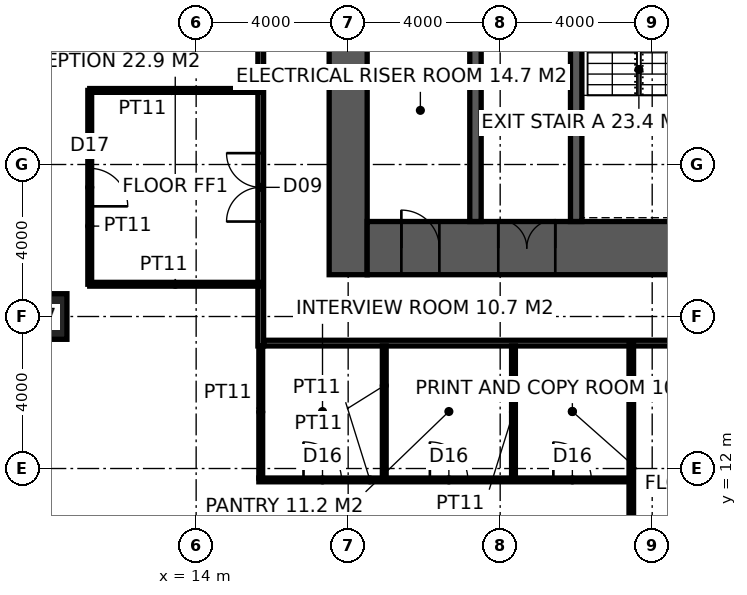
"""IFC4 building model, lengths in metres.
Left out: names, types, materials, properties, quantities, classifications, styles, units other than length and angle.
Written with IfcOpenShell. Run it as: python <this file> out.ifc"""

import sys

from ifc_helpers import new_model, si_unit, direction, frame, frame_2d, origin, origin_2d, place, context, subcontext, project, spatial, rectangle, hollow_rectangle, extrude, element, fill, save


model = new_model("IFC4")
c1 = context("Model", 3, precision=1e-05, world=origin(), true_north=direction((0.0, 1.0)))
c2 = subcontext(c1, "Body", "Model", "MODEL_VIEW")
j1 = project(units=[si_unit("LENGTHUNIT", "METRE"), si_unit("PLANEANGLEUNIT", "RADIAN")], contexts=[c1])
p1 = place(None, origin())
s1 = spatial("IfcSite", under=j1, at=p1, CompositionType="ELEMENT")
p2 = place(p1, origin())
s2 = spatial("IfcBuilding", under=s1, at=p2, CompositionType="ELEMENT")
p3 = place(p2, frame((0.0, 0.0, 43.0)))
s3 = spatial("IfcBuildingStorey", under=s2, at=p3, CompositionType="ELEMENT", Elevation=43.0)
p4 = place(p3, frame((10.0, 16.0, 0.0), z_axis=(0.0, 0.0, 1.0), x_axis=(1.0, 0.0, 0.0)))
e1 = element("IfcColumn", 1, at=p4, inside=s3, PredefinedType="COLUMN", context=c2, shape_type="SweptSolid", body=[
    extrude(hollow_rectangle(XDim=1.2, YDim=1.2, WallThickness=0.1, at=origin_2d()), origin(), (0.0, 0.0, 1.0), 4.0),
])
p5 = place(p3, frame((18.0, 17.1, -0.15), z_axis=(0.0, 0.0, 1.0), x_axis=(0.0, 1.0, 0.0)))
e2 = element("IfcWall", 2, at=p5, inside=s3, PredefinedType="SHEAR", context=c2, shape_type="SweptSolid", body=[
    extrude(rectangle(XDim=19.8, YDim=1.0, at=frame_2d((9.9, 0.0))), origin(), (0.0, 0.0, 1.0), 4.0),
])
p6 = place(p3, frame((18.5, 17.8, -0.15), z_axis=(0.0, 0.0, 1.0), x_axis=(1.0, 0.0, 0.0)))
e3 = element("IfcWall", 3, at=p6, inside=s3, PredefinedType="SHEAR", context=c2, shape_type="SweptSolid", body=[
    extrude(rectangle(XDim=23.4, YDim=1.4, at=frame_2d((11.7, 0.0))), origin(), (0.0, 0.0, 1.0), 4.0),
])
p7 = place(p6, frame((3.45, 0.0, 0.15)))
e4 = element("IfcOpeningElement", 4, at=p7, cuts=e3, PredefinedType="OPENING", context=c2, shape_type="SweptSolid", body=[
    extrude(rectangle(XDim=1.5, YDim=2.4, at=frame_2d((0.75, 1.2))), frame((0.0, 0.71, 0.0), z_axis=(0.0, -1.0, 0.0), x_axis=(1.0, 0.0, 0.0)), (0.0, 0.0, 1.0), 1.42),
])
p8 = place(p6, frame((17.9, 0.0, 0.15)))
e5 = element("IfcOpeningElement", 5, at=p8, cuts=e3, PredefinedType="OPENING", context=c2, shape_type="SweptSolid", body=[
    extrude(rectangle(XDim=1.5, YDim=2.4, at=frame_2d((0.75, 1.2))), frame((0.0, 0.71, 0.0), z_axis=(0.0, -1.0, 0.0), x_axis=(1.0, 0.0, 0.0)), (0.0, 0.0, 1.0), 1.42),
])
p9 = place(p6, frame((0.9, 0.0, 0.15)))
e6 = element("IfcOpeningElement", 6, at=p9, cuts=e3, PredefinedType="OPENING", context=c2, shape_type="SweptSolid", body=[
    extrude(rectangle(XDim=1.0, YDim=2.2, at=frame_2d((0.5, 1.1))), frame((0.0, 0.71, 0.0), z_axis=(0.0, -1.0, 0.0), x_axis=(1.0, 0.0, 0.0)), (0.0, 0.0, 1.0), 1.42),
])
p10 = place(p3, frame((24.0, 18.5, -0.15), z_axis=(0.0, 0.0, 1.0), x_axis=(0.0, 1.0, 0.0)))
e7 = element("IfcWall", 7, at=p10, inside=s3, PredefinedType="SHEAR", context=c2, shape_type="SweptSolid", body=[
    extrude(rectangle(XDim=17.0, YDim=0.3, at=frame_2d((8.5, 0.0))), origin(), (0.0, 0.0, 1.0), 4.0),
])
p11 = place(p10, frame((9.6, 0.0, 0.15)))
e8 = element("IfcOpeningElement", 8, at=p11, cuts=e7, PredefinedType="OPENING", context=c2, shape_type="SweptSolid", body=[
    extrude(rectangle(XDim=1.5, YDim=2.4, at=frame_2d((0.75, 1.2))), frame((0.0, 0.16, 0.0), z_axis=(0.0, -1.0, 0.0), x_axis=(1.0, 0.0, 0.0)), (0.0, 0.0, 1.0), 0.32),
])
p12 = place(p3, frame((21.35, 18.5, -0.15), z_axis=(0.0, 0.0, 1.0), x_axis=(0.0, 1.0, 0.0)))
e9 = element("IfcWall", 9, at=p12, inside=s3, PredefinedType="SHEAR", context=c2, shape_type="SweptSolid", body=[
    extrude(rectangle(XDim=12.5, YDim=0.3, at=frame_2d((6.25, 0.0))), origin(), (0.0, 0.0, 1.0), 4.0),
])
p13 = place(p12, frame((8.15, 0.0, 0.15)))
e10 = element("IfcOpeningElement", 10, at=p13, cuts=e9, PredefinedType="OPENING", context=c2, shape_type="SweptSolid", body=[
    extrude(rectangle(XDim=1.0, YDim=2.2, at=frame_2d((0.5, 1.1))), frame((0.0, 0.16, 0.0), z_axis=(0.0, -1.0, 0.0), x_axis=(1.0, 0.0, 0.0)), (0.0, 0.0, 1.0), 0.32),
])
p14 = place(p3, frame((15.7, 15.225, 0.0), z_axis=(0.0, 0.0, 1.0), x_axis=(0.0, 1.0, 0.0)))
e11 = element("IfcWall", 11, at=p14, inside=s3, PredefinedType="PARTITIONING", context=c2, shape_type="SweptSolid", body=[
    extrude(rectangle(XDim=23.55, YDim=0.15, at=frame_2d((11.775, 0.0))), origin(), (0.0, 0.0, 1.0), 3.85),
])
p15 = place(p14, frame((3.274, 0.0, 0.0)))
e12 = element("IfcOpeningElement", 12, at=p15, cuts=e11, PredefinedType="OPENING", context=c2, shape_type="SweptSolid", body=[
    extrude(rectangle(XDim=1.8, YDim=2.4, at=frame_2d((0.9, 1.2))), frame((0.0, 0.085, 0.0), z_axis=(0.0, -1.0, 0.0), x_axis=(1.0, 0.0, 0.0)), (0.0, 0.0, 1.0), 0.17),
])
p16 = place(p14, frame((17.475, 0.0, 0.0)))
e13 = element("IfcOpeningElement", 13, at=p16, cuts=e11, PredefinedType="OPENING", context=c2, shape_type="SweptSolid", body=[
    extrude(rectangle(XDim=1.8, YDim=2.4, at=frame_2d((0.9, 1.2))), frame((0.0, 0.085, 0.0), z_axis=(0.0, -1.0, 0.0), x_axis=(1.0, 0.0, 0.0)), (0.0, 0.0, 1.0), 0.17),
])
p17 = place(p14, frame((10.275, 0.0, 0.0)))
e14 = element("IfcOpeningElement", 14, at=p17, cuts=e11, PredefinedType="OPENING", context=c2, shape_type="SweptSolid", body=[
    extrude(rectangle(XDim=1.0, YDim=2.2, at=frame_2d((0.5, 1.1))), frame((0.0, 0.085, 0.0), z_axis=(0.0, -1.0, 0.0), x_axis=(1.0, 0.0, 0.0)), (0.0, 0.0, 1.0), 0.17),
])
p18 = place(p3, frame((15.775, 15.3, 0.0), z_axis=(0.0, 0.0, 1.0), x_axis=(1.0, 0.0, 0.0)))
e15 = element("IfcWall", 15, at=p18, inside=s3, PredefinedType="PARTITIONING", context=c2, shape_type="SweptSolid", body=[
    extrude(rectangle(XDim=28.45, YDim=0.15, at=frame_2d((14.225, 0.0))), origin(), (0.0, 0.0, 1.0), 3.85),
])
p19 = place(p18, frame((11.725, 0.0, 0.0)))
e16 = element("IfcOpeningElement", 16, at=p19, cuts=e15, PredefinedType="OPENING", context=c2, shape_type="SweptSolid", body=[
    extrude(rectangle(XDim=1.0, YDim=2.2, at=frame_2d((0.5, 1.1))), frame((0.0, 0.085, 0.0), z_axis=(0.0, -1.0, 0.0), x_axis=(1.0, 0.0, 0.0)), (0.0, 0.0, 1.0), 0.17),
])
p20 = place(p3, frame((25.45, 0.68, 0.0), z_axis=(0.0, 0.0, 1.0), x_axis=(0.0, 1.0, 0.0)))
e17 = element("IfcWall", 17, at=p20, inside=s3, PredefinedType="PARTITIONING", context=c2, shape_type="SweptSolid", body=[
    extrude(rectangle(XDim=14.62, YDim=0.12, at=frame_2d((7.31, 0.0))), origin(), (0.0, 0.0, 1.0), 2.65),
])
p21 = place(p3, frame((15.65, 11.7, 0.0), z_axis=(0.0, 0.0, 1.0), x_axis=(1.0, 0.0, 0.0)))
e18 = element("IfcWall", 18, at=p21, inside=s3, PredefinedType="PARTITIONING", context=c2, shape_type="SweptSolid", body=[
    extrude(rectangle(XDim=9.739, YDim=0.1, at=frame_2d((4.87, 0.0))), origin(), (0.0, 0.0, 1.0), 3.85),
])
p22 = place(p21, frame((1.175, 0.0, 0.0)))
e19 = element("IfcOpeningElement", 19, at=p22, cuts=e18, PredefinedType="OPENING", context=c2, shape_type="SweptSolid", body=[
    extrude(rectangle(XDim=1.0, YDim=2.2, at=frame_2d((0.5, 1.1))), frame((0.0, 0.06, 0.0), z_axis=(0.0, -1.0, 0.0), x_axis=(1.0, 0.0, 0.0)), (0.0, 0.0, 1.0), 0.12),
])
p23 = place(p21, frame((4.5, 0.0, 0.0)))
e20 = element("IfcOpeningElement", 20, at=p23, cuts=e18, PredefinedType="OPENING", context=c2, shape_type="SweptSolid", body=[
    extrude(rectangle(XDim=1.0, YDim=2.2, at=frame_2d((0.5, 1.1))), frame((0.0, 0.06, 0.0), z_axis=(0.0, -1.0, 0.0), x_axis=(1.0, 0.0, 0.0)), (0.0, 0.0, 1.0), 0.12),
])
p24 = place(p21, frame((7.75, 0.0, 0.0)))
e21 = element("IfcOpeningElement", 21, at=p24, cuts=e18, PredefinedType="OPENING", context=c2, shape_type="SweptSolid", body=[
    extrude(rectangle(XDim=1.0, YDim=2.2, at=frame_2d((0.5, 1.1))), frame((0.0, 0.06, 0.0), z_axis=(0.0, -1.0, 0.0), x_axis=(1.0, 0.0, 0.0)), (0.0, 0.0, 1.0), 0.12),
])
for number, where, z_axis, x_axis in (
    (22, (15.7, 11.75, 0.0), (0.0, 0.0, 1.0), (0.0, 1.0, 0.0)),
    (23, (18.95, 11.75, 0.0), (0.0, 0.0, 1.0), (0.0, 1.0, 0.0)),
):
    element("IfcWall", number, at=place(p3, frame(where, z_axis=z_axis, x_axis=x_axis)), inside=s3, PredefinedType="PARTITIONING", context=c2, shape_type="SweptSolid", body=[
        extrude(rectangle(XDim=3.475, YDim=0.1, at=frame_2d((1.738, 0.0))), origin(), (0.0, 0.0, 1.0), 3.85),
    ])
p25 = place(p3, frame((22.35, 11.75, 0.0), z_axis=(0.0, 0.0, 1.0), x_axis=(0.0, 1.0, 0.0)))
e24 = element("IfcWall", 24, at=p25, inside=s3, PredefinedType="PARTITIONING", context=c2, shape_type="SweptSolid", body=[
    extrude(rectangle(XDim=3.475, YDim=0.1, at=frame_2d((1.738, 0.0))), origin(), (0.0, 0.0, 1.0), 2.65),
])
p26 = place(p3, frame((15.7, 21.949, 0.0), z_axis=(0.0, 0.0, 1.0), x_axis=(-1.0, 0.0, 0.0)))
e25 = element("IfcWall", 25, at=p26, inside=s3, PredefinedType="PARTITIONING", context=c2, shape_type="SweptSolid", body=[
    extrude(rectangle(XDim=4.5, YDim=0.1, at=frame_2d((2.25, 0.0))), origin(), (0.0, 0.0, 1.0), 3.85),
])
p27 = place(p3, frame((11.2, 21.949, 0.0), z_axis=(0.0, 0.0, 1.0), x_axis=(0.0, -1.0, 0.0)))
e26 = element("IfcWall", 26, at=p27, inside=s3, PredefinedType="PARTITIONING", context=c2, shape_type="SweptSolid", body=[
    extrude(rectangle(XDim=5.1, YDim=0.1, at=frame_2d((2.55, 0.0))), origin(), (0.0, 0.0, 1.0), 3.85),
])
p28 = place(p27, frame((2.05, 0.0, 0.0)))
e27 = element("IfcOpeningElement", 27, at=p28, cuts=e26, PredefinedType="OPENING", context=c2, shape_type="SweptSolid", body=[
    extrude(rectangle(XDim=1.0, YDim=2.2, at=frame_2d((0.5, 1.1))), frame((0.0, 0.06, 0.0), z_axis=(0.0, -1.0, 0.0), x_axis=(1.0, 0.0, 0.0)), (0.0, 0.0, 1.0), 0.12),
])
p29 = place(p3, frame((11.2, 16.849, 0.0), z_axis=(0.0, 0.0, 1.0), x_axis=(1.0, 0.0, 0.0)))
e28 = element("IfcWall", 28, at=p29, inside=s3, PredefinedType="PARTITIONING", context=c2, shape_type="SweptSolid", body=[
    extrude(rectangle(XDim=4.5, YDim=0.1, at=frame_2d((2.25, 0.0))), origin(), (0.0, 0.0, 1.0), 3.85),
])
p30 = place(p7, origin())
e29 = element("IfcDoor", 29, at=p30, inside=s3, OperationType="DOUBLE_DOOR_DOUBLE_SWING", PredefinedType="DOOR", context=c2, shape_type="SweptSolid", body=[
    extrude(rectangle(XDim=1.5, YDim=2.4, at=frame_2d((0.75, 1.2))), frame((0.0, 0.025, 0.0), z_axis=(0.0, -1.0, 0.0), x_axis=(1.0, 0.0, 0.0)), (0.0, 0.0, 1.0), 0.05),
])
fill(e4, e29)
p31 = place(p9, origin())
e30 = element("IfcDoor", 30, at=p31, inside=s3, OperationType="SINGLE_SWING_LEFT", PredefinedType="DOOR", context=c2, shape_type="SweptSolid", body=[
    extrude(rectangle(XDim=1.0, YDim=2.2, at=frame_2d((0.5, 1.1))), frame((0.0, 0.025, 0.0), z_axis=(0.0, -1.0, 0.0), x_axis=(1.0, 0.0, 0.0)), (0.0, 0.0, 1.0), 0.05),
])
fill(e6, e30)
p32 = place(p15, origin())
e31 = element("IfcDoor", 31, at=p32, inside=s3, OperationType="DOUBLE_DOOR_DOUBLE_SWING", PredefinedType="DOOR", context=c2, shape_type="SweptSolid", body=[
    extrude(rectangle(XDim=1.8, YDim=2.4, at=frame_2d((0.9, 1.2))), frame((0.0, 0.025, 0.0), z_axis=(0.0, -1.0, 0.0), x_axis=(1.0, 0.0, 0.0)), (0.0, 0.0, 1.0), 0.05),
])
fill(e12, e31)
p33 = place(p22, origin())
e32 = element("IfcDoor", 32, at=p33, inside=s3, OperationType="SINGLE_SWING_LEFT", PredefinedType="DOOR", context=c2, shape_type="SweptSolid", body=[
    extrude(rectangle(XDim=1.0, YDim=2.2, at=frame_2d((0.5, 1.1))), frame((0.0, 0.025, 0.0), z_axis=(0.0, -1.0, 0.0), x_axis=(1.0, 0.0, 0.0)), (0.0, 0.0, 1.0), 0.05),
])
fill(e19, e32)
p34 = place(p23, origin())
e33 = element("IfcDoor", 33, at=p34, inside=s3, OperationType="SINGLE_SWING_LEFT", PredefinedType="DOOR", context=c2, shape_type="SweptSolid", body=[
    extrude(rectangle(XDim=1.0, YDim=2.2, at=frame_2d((0.5, 1.1))), frame((0.0, 0.025, 0.0), z_axis=(0.0, -1.0, 0.0), x_axis=(1.0, 0.0, 0.0)), (0.0, 0.0, 1.0), 0.05),
])
fill(e20, e33)
p35 = place(p24, origin())
e34 = element("IfcDoor", 34, at=p35, inside=s3, OperationType="SINGLE_SWING_LEFT", PredefinedType="DOOR", context=c2, shape_type="SweptSolid", body=[
    extrude(rectangle(XDim=1.0, YDim=2.2, at=frame_2d((0.5, 1.1))), frame((0.0, 0.025, 0.0), z_axis=(0.0, -1.0, 0.0), x_axis=(1.0, 0.0, 0.0)), (0.0, 0.0, 1.0), 0.05),
])
fill(e21, e34)
p36 = place(p28, origin())
e35 = element("IfcDoor", 35, at=p36, inside=s3, OperationType="SINGLE_SWING_RIGHT", PredefinedType="DOOR", context=c2, shape_type="SweptSolid", body=[
    extrude(rectangle(XDim=1.0, YDim=2.2, at=frame_2d((0.5, 1.1))), frame((0.0, 0.025, 0.0), z_axis=(0.0, -1.0, 0.0), x_axis=(1.0, 0.0, 0.0)), (0.0, 0.0, 1.0), 0.05),
])
fill(e27, e35)
save(model, sys.argv[1])
